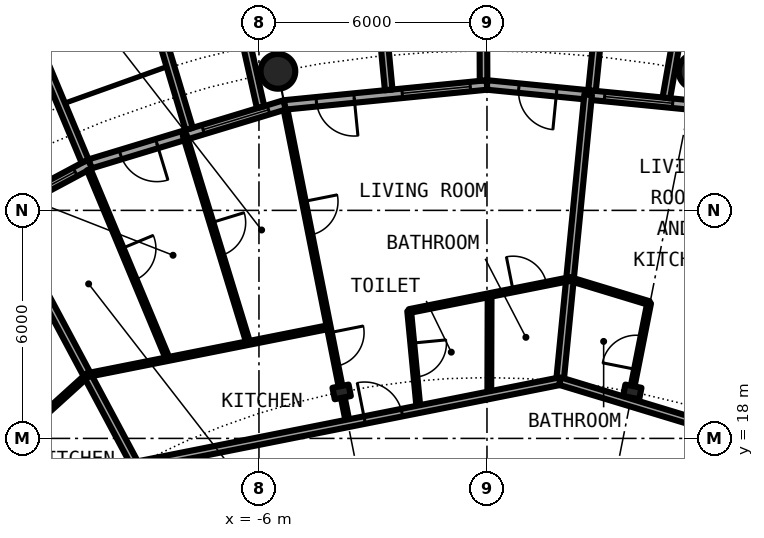
"""IFC4 building model, lengths in metres.
Left out: names, types, materials, properties, quantities, classifications, styles, units other than length and angle.
Written with IfcOpenShell. Run it as: python <this file> out.ifc"""

import sys

from ifc_helpers import new_model, si_unit, direction, frame, frame_2d, origin, origin_2d, place, context, subcontext, project, spatial, rectangle, hollow_circle, i_section, extrude, element, fill, save


model = new_model("IFC4")
c1 = context("Model", 3, precision=1e-05, world=origin(), true_north=direction((0.0, 1.0)))
c2 = subcontext(c1, "Body", "Model", "MODEL_VIEW")
j1 = project(units=[si_unit("LENGTHUNIT", "METRE"), si_unit("PLANEANGLEUNIT", "RADIAN")], contexts=[c1])
p1 = place(None, origin())
s1 = spatial("IfcSite", under=j1, at=p1, CompositionType="ELEMENT")
p2 = place(p1, origin())
s2 = spatial("IfcBuilding", under=s1, at=p2, CompositionType="ELEMENT")
p3 = place(p2, frame((0.0, 0.0, 129.95)))
s3 = spatial("IfcBuildingStorey", under=s2, at=p3, CompositionType="ELEMENT", Elevation=129.95)
for number, where, z_axis, x_axis in (
    (1, (5.501, 27.658, 0.0), (0.0, 0.0, 1.0), (1.0, 0.0, 0.0)),
    (2, (-5.501, 27.658, 0.0), (0.0, 0.0, 1.0), (1.0, 0.0, 0.0)),
):
    element("IfcColumn", number, at=place(p3, frame(where, z_axis=z_axis, x_axis=x_axis)), inside=s3, PredefinedType="COLUMN", context=c2, shape_type="SweptSolid", body=[
        extrude(hollow_circle(Radius=0.457, WallThickness=0.04, at=origin_2d()), origin(), (0.0, 0.0, 1.0), 3.05),
    ])
for number, where, z_axis, x_axis in (
    (3, (3.824, 19.223, 0.0), (0.0, 0.0, 1.0), (0.195, 0.981, 0.0)),
    (4, (-3.824, 19.223, 0.0), (0.0, 0.0, 1.0), (-0.195, 0.981, 0.0)),
):
    element("IfcColumn", number, at=place(p3, frame(where, z_axis=z_axis, x_axis=x_axis)), inside=s3, PredefinedType="COLUMN", context=c2, shape_type="SweptSolid", body=[
        extrude(i_section(OverallWidth=0.307, OverallDepth=0.432, WebThickness=0.021, FlangeThickness=0.04, FilletRadius=0.027, at=origin_2d()), origin(), (0.0, 0.0, 1.0), 3.05),
    ])
p4 = place(p3, frame((5.326, 26.775, 0.0), z_axis=(0.0, 0.0, 1.0), x_axis=(-0.995173996315, 0.098126026407, 0.0)))
e5 = element("IfcWall", 5, at=p4, inside=s3, PredefinedType="SOLIDWALL", context=c2, shape_type="SweptSolid", body=[
    extrude(rectangle(XDim=5.352, YDim=0.25, at=frame_2d((2.676, 0.0))), origin(), (0.0, 0.0, 1.0), 2.7),
])
p5 = place(p4, frame((0.441, 0.0, 0.3)))
e6 = element("IfcOpeningElement", 6, at=p5, cuts=e5, PredefinedType="OPENING", context=c2, shape_type="SweptSolid", body=[
    extrude(rectangle(XDim=1.8, YDim=2.1, at=frame_2d((0.9, 1.05))), frame((0.0, 0.135, 0.0), z_axis=(0.0, -1.0, 0.0), x_axis=(1.0, 0.0, 0.0)), (0.0, 0.0, 1.0), 0.27),
])
p6 = place(p4, frame((3.51, 0.0, 0.0)))
e7 = element("IfcOpeningElement", 7, at=p6, cuts=e5, PredefinedType="OPENING", context=c2, shape_type="SweptSolid", body=[
    extrude(rectangle(XDim=1.0, YDim=2.2, at=frame_2d((0.5, 1.1))), frame((0.0, 0.135, 0.0), z_axis=(0.0, -1.0, 0.0), x_axis=(1.0, 0.0, 0.0)), (0.0, 0.0, 1.0), 0.27),
])
p7 = place(p3, frame((4.72, 26.961, -0.03), z_axis=(0.0, 0.0, 1.0), x_axis=(0.172463232037, 0.98501595601, 0.0)))
e8 = element("IfcWall", 8, at=p7, inside=s3, PredefinedType="SOLIDWALL", context=c2, shape_type="SweptSolid", body=[
    extrude(rectangle(XDim=2.929, YDim=0.2, at=frame_2d((1.464, 0.0))), origin(), (0.0, 0.0, 1.0), 2.73),
])
p8 = place(p3, frame((2.764, 27.153, -0.03), z_axis=(0.0, 0.0, 1.0), x_axis=(0.101505487237, 0.994834979311, 0.0)))
e9 = element("IfcWall", 9, at=p8, inside=s3, PredefinedType="SOLIDWALL", context=c2, shape_type="SweptSolid", body=[
    extrude(rectangle(XDim=3.007, YDim=0.2, at=frame_2d((1.503, 0.0))), origin(), (0.0, 0.0, 1.0), 2.73),
])
p9 = place(p3, frame((0.0, 27.3, 0.0), z_axis=(0.0, 0.0, 1.0), x_axis=(-0.995173996315, -0.098126026407, 0.0)))
e10 = element("IfcWall", 10, at=p9, inside=s3, PredefinedType="SOLIDWALL", context=c2, shape_type="SweptSolid", body=[
    extrude(rectangle(XDim=5.352, YDim=0.25, at=frame_2d((2.676, 0.0))), origin(), (0.0, 0.0, 1.0), 2.7),
])
p10 = place(p9, frame((0.441, 0.0, 0.3)))
e11 = element("IfcOpeningElement", 11, at=p10, cuts=e10, PredefinedType="OPENING", context=c2, shape_type="SweptSolid", body=[
    extrude(rectangle(XDim=1.8, YDim=2.1, at=frame_2d((0.9, 1.05))), frame((0.0, 0.135, 0.0), z_axis=(0.0, -1.0, 0.0), x_axis=(1.0, 0.0, 0.0)), (0.0, 0.0, 1.0), 0.27),
])
p11 = place(p9, frame((3.51, 0.0, 0.0)))
e12 = element("IfcOpeningElement", 12, at=p11, cuts=e10, PredefinedType="OPENING", context=c2, shape_type="SweptSolid", body=[
    extrude(rectangle(XDim=1.0, YDim=2.2, at=frame_2d((0.5, 1.1))), frame((0.0, 0.135, 0.0), z_axis=(0.0, -1.0, 0.0), x_axis=(1.0, 0.0, 0.0)), (0.0, 0.0, 1.0), 0.27),
])
p12 = place(p3, frame((-0.09, 27.417, -0.03), z_axis=(0.0, 0.0, 1.0), x_axis=(-0.00347308367, 0.999993968827, 0.0)))
e13 = element("IfcWall", 13, at=p12, inside=s3, PredefinedType="SOLIDWALL", context=c2, shape_type="SweptSolid", body=[
    extrude(rectangle(XDim=2.882, YDim=0.2, at=frame_2d((1.441, 0.0))), origin(), (0.0, 0.0, 1.0), 2.73),
])
p13 = place(p3, frame((-2.586, 27.171, -0.03), z_axis=(0.0, 0.0, 1.0), x_axis=(-0.094548432284, 0.995520262954, 0.0)))
e14 = element("IfcWall", 14, at=p13, inside=s3, PredefinedType="SOLIDWALL", context=c2, shape_type="SweptSolid", body=[
    extrude(rectangle(XDim=3.006, YDim=0.2, at=frame_2d((1.503, 0.0))), origin(), (0.0, 0.0, 1.0), 2.73),
])
p14 = place(p3, frame((-5.326, 26.775, 0.0), z_axis=(0.0, 0.0, 1.0), x_axis=(-0.956965678721, -0.290201119486, 0.0)))
e15 = element("IfcWall", 15, at=p14, inside=s3, PredefinedType="SOLIDWALL", context=c2, shape_type="SweptSolid", body=[
    extrude(rectangle(XDim=5.351, YDim=0.25, at=frame_2d((2.676, 0.0))), origin(), (0.0, 0.0, 1.0), 2.7),
])
p15 = place(p14, frame((0.441, 0.0, 0.3)))
e16 = element("IfcOpeningElement", 16, at=p15, cuts=e15, PredefinedType="OPENING", context=c2, shape_type="SweptSolid", body=[
    extrude(rectangle(XDim=1.8, YDim=2.1, at=frame_2d((0.9, 1.05))), frame((0.0, 0.135, 0.0), z_axis=(0.0, -1.0, 0.0), x_axis=(1.0, 0.0, 0.0)), (0.0, 0.0, 1.0), 0.27),
])
p16 = place(p14, frame((3.51, 0.0, 0.0)))
e17 = element("IfcOpeningElement", 17, at=p16, cuts=e15, PredefinedType="OPENING", context=c2, shape_type="SweptSolid", body=[
    extrude(rectangle(XDim=1.0, YDim=2.2, at=frame_2d((0.5, 1.1))), frame((0.0, 0.135, 0.0), z_axis=(0.0, -1.0, 0.0), x_axis=(1.0, 0.0, 0.0)), (0.0, 0.0, 1.0), 0.27),
])
p17 = place(p3, frame((-5.957, 26.715, -0.03), z_axis=(0.0, 0.0, 1.0), x_axis=(-0.217857287091, 0.975980636315, 0.0)))
e18 = element("IfcWall", 18, at=p17, inside=s3, PredefinedType="SOLIDWALL", context=c2, shape_type="SweptSolid", body=[
    extrude(rectangle(XDim=2.928, YDim=0.2, at=frame_2d((1.464, 0.0))), origin(), (0.0, 0.0, 1.0), 2.73),
])
p18 = place(p3, frame((-7.837, 26.144, -0.03), z_axis=(0.0, 0.0, 1.0), x_axis=(-0.287064767992, 0.957911174889, 0.0)))
e19 = element("IfcWall", 19, at=p18, inside=s3, PredefinedType="SOLIDWALL", context=c2, shape_type="SweptSolid", body=[
    extrude(rectangle(XDim=3.006, YDim=0.2, at=frame_2d((1.503, 0.0))), origin(), (0.0, 0.0, 1.0), 2.73),
])
p19 = place(p3, frame((-10.447, 25.222, 0.0), z_axis=(0.0, 0.0, 1.0), x_axis=(-0.881915646801, -0.471407246368, 0.0)))
e20 = element("IfcWall", 20, at=p19, inside=s3, PredefinedType="SOLIDWALL", context=c2, shape_type="SweptSolid", body=[
    extrude(rectangle(XDim=5.352, YDim=0.25, at=frame_2d((2.676, 0.0))), origin(), (0.0, 0.0, 1.0), 2.7),
])
p20 = place(p19, frame((0.441, 0.0, 0.3)))
e21 = element("IfcOpeningElement", 21, at=p20, cuts=e20, PredefinedType="OPENING", context=c2, shape_type="SweptSolid", body=[
    extrude(rectangle(XDim=1.8, YDim=2.1, at=frame_2d((0.9, 1.05))), frame((0.0, 0.135, 0.0), z_axis=(0.0, -1.0, 0.0), x_axis=(1.0, 0.0, 0.0)), (0.0, 0.0, 1.0), 0.27),
])
p21 = place(p19, frame((3.51, 0.0, 0.0)))
e22 = element("IfcOpeningElement", 22, at=p21, cuts=e20, PredefinedType="OPENING", context=c2, shape_type="SweptSolid", body=[
    extrude(rectangle(XDim=1.0, YDim=2.2, at=frame_2d((0.5, 1.1))), frame((0.0, 0.135, 0.0), z_axis=(0.0, -1.0, 0.0), x_axis=(1.0, 0.0, 0.0)), (0.0, 0.0, 1.0), 0.27),
])
p22 = place(p3, frame((-10.575, 25.295, -0.03), z_axis=(0.0, 0.0, 1.0), x_axis=(-0.385697364644, 0.922625353492, 0.0)))
e23 = element("IfcWall", 23, at=p22, inside=s3, PredefinedType="SOLIDWALL", context=c2, shape_type="SweptSolid", body=[
    extrude(rectangle(XDim=2.883, YDim=0.2, at=frame_2d((1.442, 0.0))), origin(), (0.0, 0.0, 1.0), 2.73),
])
p23 = place(p3, frame((-12.815, 23.963, 0.0), z_axis=(0.0, 0.0, 1.0), x_axis=(0.471506520577, -0.881862574925, 0.0)))
e24 = element("IfcWall", 24, at=p23, inside=s3, PredefinedType="PARTITIONING", context=c2, shape_type="SweptSolid", body=[
    extrude(rectangle(XDim=7.574, YDim=0.2, at=frame_2d((3.787, 0.0))), origin(), (0.0, 0.0, 1.0), 2.7),
])
p24 = place(p3, frame((-10.479, 25.073, 0.0), z_axis=(0.0, 0.0, 1.0), x_axis=(0.385542476694, -0.922690088093, 0.0)))
e25 = element("IfcWall", 25, at=p24, inside=s3, PredefinedType="PARTITIONING", context=c2, shape_type="SweptSolid", body=[
    extrude(rectangle(XDim=5.403, YDim=0.1, at=frame_2d((2.701, 0.0))), origin(), (0.0, 0.0, 1.0), 2.7),
])
p25 = place(p24, frame((2.251, 0.0, 0.0)))
e26 = element("IfcOpeningElement", 26, at=p25, cuts=e25, PredefinedType="OPENING", context=c2, shape_type="SweptSolid", body=[
    extrude(rectangle(XDim=0.9, YDim=2.3, at=frame_2d((0.45, 1.15))), frame((0.0, 0.06, 0.0), z_axis=(0.0, -1.0, 0.0), x_axis=(1.0, 0.0, 0.0)), (0.0, 0.0, 1.0), 0.12),
])
p26 = place(p3, frame((-7.956, 25.984, 0.0), z_axis=(0.0, 0.0, 1.0), x_axis=(0.292722228482, -0.956197519842, 0.0)))
e27 = element("IfcWall", 27, at=p26, inside=s3, PredefinedType="PARTITIONING", context=c2, shape_type="SweptSolid", body=[
    extrude(rectangle(XDim=5.726, YDim=0.1, at=frame_2d((2.863, 0.0))), origin(), (0.0, 0.0, 1.0), 2.7),
])
p27 = place(p26, frame((2.413, 0.0, 0.0)))
e28 = element("IfcOpeningElement", 28, at=p27, cuts=e27, PredefinedType="OPENING", context=c2, shape_type="SweptSolid", body=[
    extrude(rectangle(XDim=0.9, YDim=2.3, at=frame_2d((0.45, 1.15))), frame((0.0, 0.06, 0.0), z_axis=(0.0, -1.0, 0.0), x_axis=(1.0, 0.0, 0.0)), (0.0, 0.0, 1.0), 0.12),
])
p28 = place(p3, frame((-5.301, 26.653, 0.0), z_axis=(0.0, 0.0, 1.0), x_axis=(0.194999559373, -0.98080332985, 0.0)))
e29 = element("IfcWall", 29, at=p28, inside=s3, PredefinedType="PARTITIONING", context=c2, shape_type="SweptSolid", body=[
    extrude(rectangle(XDim=7.359, YDim=0.1, at=frame_2d((3.68, 0.0))), origin(), (0.0, 0.0, 1.0), 2.7),
])
p29 = place(p28, frame((5.985, 0.0, 0.0)))
e30 = element("IfcOpeningElement", 30, at=p29, cuts=e29, PredefinedType="OPENING", context=c2, shape_type="SweptSolid", body=[
    extrude(rectangle(XDim=0.9, YDim=2.3, at=frame_2d((0.45, 1.15))), frame((0.0, 0.06, 0.0), z_axis=(0.0, -1.0, 0.0), x_axis=(1.0, 0.0, 0.0)), (0.0, 0.0, 1.0), 0.12),
])
p30 = place(p28, frame((2.467, 0.0, 0.0)))
e31 = element("IfcOpeningElement", 31, at=p30, cuts=e29, PredefinedType="OPENING", context=c2, shape_type="SweptSolid", body=[
    extrude(rectangle(XDim=0.9, YDim=2.3, at=frame_2d((0.45, 1.15))), frame((0.0, 0.06, 0.0), z_axis=(0.0, -1.0, 0.0), x_axis=(1.0, 0.0, 0.0)), (0.0, 0.0, 1.0), 0.12),
])
p31 = place(p3, frame((-3.781, 19.012, 0.0), z_axis=(0.0, 0.0, 1.0), x_axis=(0.194396175087, -0.980923099489, 0.0)))
e32 = element("IfcWall", 32, at=p31, inside=s3, PredefinedType="PARTITIONING", context=c2, shape_type="SweptSolid", body=[
    extrude(rectangle(XDim=0.628, YDim=0.1, at=frame_2d((0.314, 0.0))), origin(), (0.0, 0.0, 1.0), 2.7),
])
p32 = place(p3, frame((-2.047, 21.351, 0.0), z_axis=(0.0, 0.0, 1.0), x_axis=(0.095518932305, -0.995427613426, 0.0)))
e33 = element("IfcWall", 33, at=p32, inside=s3, PredefinedType="PARTITIONING", context=c2, shape_type="SweptSolid", body=[
    extrude(rectangle(XDim=2.597, YDim=0.1, at=frame_2d((1.298, 0.0))), origin(), (0.0, 0.0, 1.0), 2.7),
])
p33 = place(p32, frame((0.848, 0.0, 0.0)))
e34 = element("IfcOpeningElement", 34, at=p33, cuts=e33, PredefinedType="OPENING", context=c2, shape_type="SweptSolid", body=[
    extrude(rectangle(XDim=0.9, YDim=2.3, at=frame_2d((0.45, 1.15))), frame((0.0, 0.06, 0.0), z_axis=(0.0, -1.0, 0.0), x_axis=(1.0, 0.0, 0.0)), (0.0, 0.0, 1.0), 0.12),
])
p34 = place(p3, frame((0.061, 19.136, 0.0), z_axis=(0.0, 0.0, 1.0), x_axis=(0.003056390281, 0.999995329228, 0.0)))
e35 = element("IfcWall", 35, at=p34, inside=s3, PredefinedType="PARTITIONING", context=c2, shape_type="SweptSolid", body=[
    extrude(rectangle(XDim=2.636, YDim=0.1, at=frame_2d((1.318, 0.0))), origin(), (0.0, 0.0, 1.0), 2.7),
])
p35 = place(p3, frame((1.92, 19.506, 0.0), z_axis=(0.0, 0.0, 1.0), x_axis=(0.097987704654, 0.995187625394, 0.0)))
e36 = element("IfcWall", 36, at=p35, inside=s3, PredefinedType="PARTITIONING", context=c2, shape_type="SweptSolid", body=[
    extrude(rectangle(XDim=7.574, YDim=0.2, at=frame_2d((3.787, 0.0))), origin(), (0.0, 0.0, 1.0), 2.7),
])
p36 = place(p3, frame((3.847, 19.439, 0.0), z_axis=(0.0, 0.0, 1.0), x_axis=(0.194227580483, 0.980956495967, 0.0)))
e37 = element("IfcWall", 37, at=p36, inside=s3, PredefinedType="PARTITIONING", context=c2, shape_type="SweptSolid", body=[
    extrude(rectangle(XDim=2.163, YDim=0.1, at=frame_2d((1.082, 0.0))), origin(), (0.0, 0.0, 1.0), 2.7),
])
p37 = place(p36, frame((0.383, 0.0, 0.0)))
e38 = element("IfcOpeningElement", 38, at=p37, cuts=e37, PredefinedType="OPENING", context=c2, shape_type="SweptSolid", body=[
    extrude(rectangle(XDim=0.9, YDim=2.3, at=frame_2d((0.45, 1.15))), frame((0.0, 0.06, 0.0), z_axis=(0.0, -1.0, 0.0), x_axis=(1.0, 0.0, 0.0)), (0.0, 0.0, 1.0), 0.12),
])
p38 = place(p3, frame((-9.239, 17.286, 0.0), z_axis=(0.0, 0.0, 1.0), x_axis=(0.98077905287, 0.195121627328, 0.0)))
e39 = element("IfcWall", 39, at=p38, inside=s3, PredefinedType="PARTITIONING", context=c2, shape_type="SweptSolid", body=[
    extrude(rectangle(XDim=11.379, YDim=0.2, at=frame_2d((5.689, 0.0))), origin(), (0.0, 0.0, 1.0), 2.39),
])
p39 = place(p38, frame((6.138, 0.0, 0.0)))
e40 = element("IfcOpeningElement", 40, at=p39, cuts=e39, PredefinedType="OPENING", context=c2, shape_type="SweptSolid", body=[
    extrude(rectangle(XDim=1.0, YDim=2.3, at=frame_2d((0.5, 1.15))), frame((0.0, 0.11, 0.0), z_axis=(0.0, -1.0, 0.0), x_axis=(1.0, 0.0, 0.0)), (0.0, 0.0, 1.0), 0.22),
])
p40 = place(p3, frame((1.921, 19.506, 0.0), z_axis=(0.0, 0.0, 1.0), x_axis=(0.956929842753, -0.290319265721, 0.0)))
e41 = element("IfcWall", 41, at=p40, inside=s3, PredefinedType="PARTITIONING", context=c2, shape_type="SweptSolid", body=[
    extrude(rectangle(XDim=7.647, YDim=0.2, at=frame_2d((3.824, 0.0))), origin(), (0.0, 0.0, 1.0), 2.39),
])
p41 = place(p40, frame((4.28, 0.0, 0.0)))
e42 = element("IfcOpeningElement", 42, at=p41, cuts=e41, PredefinedType="OPENING", context=c2, shape_type="SweptSolid", body=[
    extrude(rectangle(XDim=1.0, YDim=2.3, at=frame_2d((0.5, 1.15))), frame((0.0, 0.11, 0.0), z_axis=(0.0, -1.0, 0.0), x_axis=(1.0, 0.0, 0.0)), (0.0, 0.0, 1.0), 0.22),
])
p42 = place(p3, frame((-10.513, 19.667, 0.0), z_axis=(0.0, 0.0, 1.0), x_axis=(0.980783231687, 0.195100621324, 0.0)))
e43 = element("IfcWall", 43, at=p42, inside=s3, PredefinedType="PARTITIONING", context=c2, shape_type="SweptSolid", body=[
    extrude(rectangle(XDim=6.473, YDim=0.1, at=frame_2d((3.237, 0.0))), origin(), (0.0, 0.0, 1.0), 2.7),
])
p43 = place(p3, frame((-2.048, 21.351, 0.0), z_axis=(0.0, 0.0, 1.0), x_axis=(0.980784647647, 0.19509350307, 0.0)))
e44 = element("IfcWall", 44, at=p43, inside=s3, PredefinedType="PARTITIONING", context=c2, shape_type="SweptSolid", body=[
    extrude(rectangle(XDim=4.316, YDim=0.1, at=frame_2d((2.158, 0.0))), origin(), (0.0, 0.0, 1.0), 2.7),
])
p44 = place(p43, frame((2.788, 0.0, 0.0)))
e45 = element("IfcOpeningElement", 45, at=p44, cuts=e44, PredefinedType="OPENING", context=c2, shape_type="SweptSolid", body=[
    extrude(rectangle(XDim=0.9, YDim=2.3, at=frame_2d((0.45, 1.15))), frame((0.0, 0.06, 0.0), z_axis=(0.0, -1.0, 0.0), x_axis=(1.0, 0.0, 0.0)), (0.0, 0.0, 1.0), 0.12),
])
p45 = place(p3, frame((-13.724, 16.755, 0.0), z_axis=(0.0, 0.0, 1.0), x_axis=(0.741022791884, 0.671479874537, 0.0)))
e46 = element("IfcWall", 46, at=p45, inside=s3, PredefinedType="PARTITIONING", context=c2, shape_type="SweptSolid", body=[
    extrude(rectangle(XDim=4.343, YDim=0.1, at=frame_2d((2.171, 0.0))), origin(), (0.0, 0.0, 1.0), 2.7),
])
p46 = place(p3, frame((2.186, 22.193, 0.0), z_axis=(0.0, 0.0, 1.0), x_axis=(0.956838221976, -0.290621088303, 0.0)))
e47 = element("IfcWall", 47, at=p46, inside=s3, PredefinedType="PARTITIONING", context=c2, shape_type="SweptSolid", body=[
    extrude(rectangle(XDim=2.175, YDim=0.1, at=frame_2d((1.087, 0.0))), origin(), (0.0, 0.0, 1.0), 2.7),
])
p47 = place(p5, origin())
e48 = element("IfcWindow", 48, at=p47, inside=s3, PartitioningType="SINGLE_PANEL", PredefinedType="WINDOW", context=c2, shape_type="SweptSolid", body=[
    extrude(rectangle(XDim=1.8, YDim=2.1, at=frame_2d((0.9, 1.05))), frame((0.0, 0.03, 0.0), z_axis=(0.0, -1.0, 0.0), x_axis=(1.0, 0.0, 0.0)), (0.0, 0.0, 1.0), 0.06),
])
fill(e6, e48)
p48 = place(p6, origin())
e49 = element("IfcDoor", 49, at=p48, inside=s3, OperationType="SINGLE_SWING_LEFT", PredefinedType="DOOR", context=c2, shape_type="SweptSolid", body=[
    extrude(rectangle(XDim=1.0, YDim=2.2, at=frame_2d((0.5, 1.1))), frame((0.0, 0.025, 0.0), z_axis=(0.0, -1.0, 0.0), x_axis=(1.0, 0.0, 0.0)), (0.0, 0.0, 1.0), 0.05),
])
fill(e7, e49)
p49 = place(p10, origin())
e50 = element("IfcWindow", 50, at=p49, inside=s3, PartitioningType="SINGLE_PANEL", PredefinedType="WINDOW", context=c2, shape_type="SweptSolid", body=[
    extrude(rectangle(XDim=1.8, YDim=2.1, at=frame_2d((0.9, 1.05))), frame((0.0, 0.03, 0.0), z_axis=(0.0, -1.0, 0.0), x_axis=(1.0, 0.0, 0.0)), (0.0, 0.0, 1.0), 0.06),
])
fill(e11, e50)
p50 = place(p11, origin())
e51 = element("IfcDoor", 51, at=p50, inside=s3, OperationType="SINGLE_SWING_LEFT", PredefinedType="DOOR", context=c2, shape_type="SweptSolid", body=[
    extrude(rectangle(XDim=1.0, YDim=2.2, at=frame_2d((0.5, 1.1))), frame((0.0, 0.025, 0.0), z_axis=(0.0, -1.0, 0.0), x_axis=(1.0, 0.0, 0.0)), (0.0, 0.0, 1.0), 0.05),
])
fill(e12, e51)
p51 = place(p15, origin())
e52 = element("IfcWindow", 52, at=p51, inside=s3, PartitioningType="SINGLE_PANEL", PredefinedType="WINDOW", context=c2, shape_type="SweptSolid", body=[
    extrude(rectangle(XDim=1.8, YDim=2.1, at=frame_2d((0.9, 1.05))), frame((0.0, 0.03, 0.0), z_axis=(0.0, -1.0, 0.0), x_axis=(1.0, 0.0, 0.0)), (0.0, 0.0, 1.0), 0.06),
])
fill(e16, e52)
p52 = place(p16, origin())
e53 = element("IfcDoor", 53, at=p52, inside=s3, OperationType="SINGLE_SWING_LEFT", PredefinedType="DOOR", context=c2, shape_type="SweptSolid", body=[
    extrude(rectangle(XDim=1.0, YDim=2.2, at=frame_2d((0.5, 1.1))), frame((0.0, 0.025, 0.0), z_axis=(0.0, -1.0, 0.0), x_axis=(1.0, 0.0, 0.0)), (0.0, 0.0, 1.0), 0.05),
])
fill(e17, e53)
p53 = place(p20, origin())
e54 = element("IfcWindow", 54, at=p53, inside=s3, PartitioningType="SINGLE_PANEL", PredefinedType="WINDOW", context=c2, shape_type="SweptSolid", body=[
    extrude(rectangle(XDim=1.8, YDim=2.1, at=frame_2d((0.9, 1.05))), frame((0.0, 0.03, 0.0), z_axis=(0.0, -1.0, 0.0), x_axis=(1.0, 0.0, 0.0)), (0.0, 0.0, 1.0), 0.06),
])
fill(e21, e54)
p54 = place(p37, origin())
e55 = element("IfcDoor", 55, at=p54, inside=s3, OperationType="SINGLE_SWING_LEFT", PredefinedType="DOOR", context=c2, shape_type="SweptSolid", body=[
    extrude(rectangle(XDim=0.9, YDim=2.3, at=frame_2d((0.45, 1.15))), frame((0.0, 0.025, 0.0), z_axis=(0.0, -1.0, 0.0), x_axis=(1.0, 0.0, 0.0)), (0.0, 0.0, 1.0), 0.05),
])
fill(e38, e55)
p55 = place(p39, origin())
e56 = element("IfcDoor", 56, at=p55, inside=s3, OperationType="SINGLE_SWING_RIGHT", PredefinedType="DOOR", context=c2, shape_type="SweptSolid", body=[
    extrude(rectangle(XDim=1.0, YDim=2.3, at=frame_2d((0.5, 1.15))), frame((0.0, 0.025, 0.0), z_axis=(0.0, -1.0, 0.0), x_axis=(1.0, 0.0, 0.0)), (0.0, 0.0, 1.0), 0.05),
])
fill(e40, e56)
p56 = place(p44, origin())
e57 = element("IfcDoor", 57, at=p56, inside=s3, OperationType="SINGLE_SWING_RIGHT", PredefinedType="DOOR", context=c2, shape_type="SweptSolid", body=[
    extrude(rectangle(XDim=0.9, YDim=2.3, at=frame_2d((0.45, 1.15))), frame((0.0, 0.025, 0.0), z_axis=(0.0, -1.0, 0.0), x_axis=(1.0, 0.0, 0.0)), (0.0, 0.0, 1.0), 0.05),
])
fill(e45, e57)
p57 = place(p33, origin())
e58 = element("IfcDoor", 58, at=p57, inside=s3, OperationType="SINGLE_SWING_RIGHT", PredefinedType="DOOR", context=c2, shape_type="SweptSolid", body=[
    extrude(rectangle(XDim=0.9, YDim=2.3, at=frame_2d((0.45, 1.15))), frame((0.0, 0.025, 0.0), z_axis=(0.0, -1.0, 0.0), x_axis=(1.0, 0.0, 0.0)), (0.0, 0.0, 1.0), 0.05),
])
fill(e34, e58)
p58 = place(p29, origin())
e59 = element("IfcDoor", 59, at=p58, inside=s3, OperationType="SINGLE_SWING_RIGHT", PredefinedType="DOOR", context=c2, shape_type="SweptSolid", body=[
    extrude(rectangle(XDim=0.9, YDim=2.3, at=frame_2d((0.45, 1.15))), frame((0.0, 0.025, 0.0), z_axis=(0.0, -1.0, 0.0), x_axis=(1.0, 0.0, 0.0)), (0.0, 0.0, 1.0), 0.05),
])
fill(e30, e59)
p59 = place(p30, origin())
e60 = element("IfcDoor", 60, at=p59, inside=s3, OperationType="SINGLE_SWING_LEFT", PredefinedType="DOOR", context=c2, shape_type="SweptSolid", body=[
    extrude(rectangle(XDim=0.9, YDim=2.3, at=frame_2d((0.45, 1.15))), frame((0.0, 0.025, 0.0), z_axis=(0.0, -1.0, 0.0), x_axis=(1.0, 0.0, 0.0)), (0.0, 0.0, 1.0), 0.05),
])
fill(e31, e60)
p60 = place(p27, origin())
e61 = element("IfcDoor", 61, at=p60, inside=s3, OperationType="SINGLE_SWING_RIGHT", PredefinedType="DOOR", context=c2, shape_type="SweptSolid", body=[
    extrude(rectangle(XDim=0.9, YDim=2.3, at=frame_2d((0.45, 1.15))), frame((0.0, 0.025, 0.0), z_axis=(0.0, -1.0, 0.0), x_axis=(1.0, 0.0, 0.0)), (0.0, 0.0, 1.0), 0.05),
])
fill(e28, e61)
p61 = place(p25, origin())
e62 = element("IfcDoor", 62, at=p61, inside=s3, OperationType="SINGLE_SWING_RIGHT", PredefinedType="DOOR", context=c2, shape_type="SweptSolid", body=[
    extrude(rectangle(XDim=0.9, YDim=2.3, at=frame_2d((0.45, 1.15))), frame((0.0, 0.025, 0.0), z_axis=(0.0, -1.0, 0.0), x_axis=(1.0, 0.0, 0.0)), (0.0, 0.0, 1.0), 0.05),
])
fill(e26, e62)
save(model, sys.argv[1])
